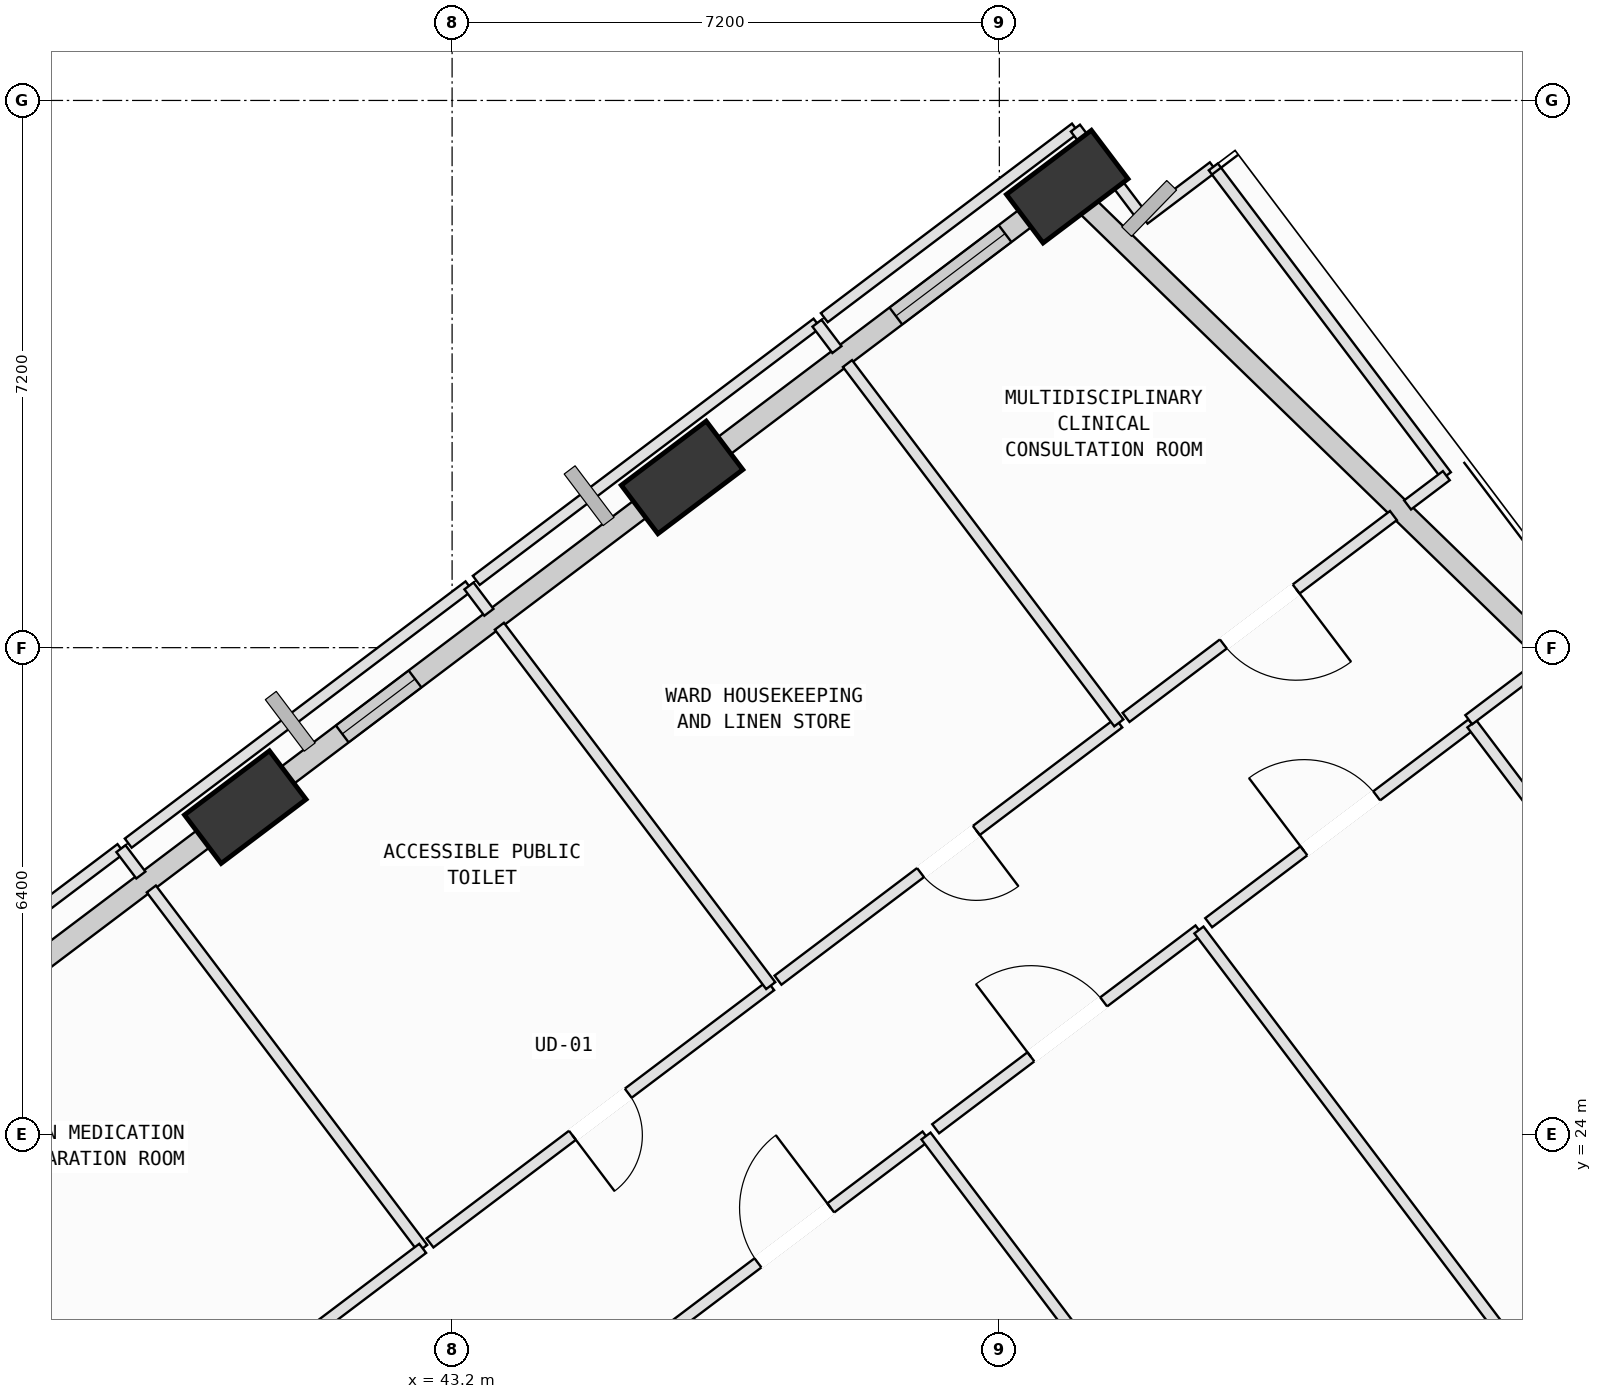
"""IFC4 building model, lengths in metres.
Left out: names, types, materials, properties, quantities, classifications, styles, units other than length and angle.
Written with IfcOpenShell. Run it as: python <this file> out.ifc"""

import sys

from ifc_helpers import new_model, si_unit, direction, frame, frame_2d, origin, origin_2d, place, context, subcontext, project, spatial, rectangle, extrude, element, fill, save


model = new_model("IFC4")
c1 = context("Model", 3, precision=1e-05, world=origin(), true_north=direction((0.0, 1.0)))
c2 = subcontext(c1, "Body", "Model", "MODEL_VIEW")
j1 = project(units=[si_unit("LENGTHUNIT", "METRE"), si_unit("PLANEANGLEUNIT", "RADIAN")], contexts=[c1])
p1 = place(None, origin())
s1 = spatial("IfcSite", under=j1, at=p1, CompositionType="ELEMENT")
p2 = place(p1, origin())
s2 = spatial("IfcBuilding", under=s1, at=p2, CompositionType="ELEMENT")
p3 = place(p2, frame((0.0, 0.0, 181.8)))
s3 = spatial("IfcBuildingStorey", under=s2, at=p3, CompositionType="ELEMENT", Elevation=181.8)
p4 = place(p3, frame((51.293, 36.466, 0.002), z_axis=(-0.048746278721, 0.072662992251, 0.996164589748), x_axis=(-0.328408762811, -0.943063285479, 0.052719295244)))
e1 = element("IfcColumn", 1, at=p4, inside=s3, PredefinedType="COLUMN", context=c2, shape_type="SweptSolid", body=[
    extrude(rectangle(XDim=1.4, YDim=0.8, at=origin_2d()), origin(), (0.0, 0.0, 1.0), 4.012),
])
p5 = place(p3, frame((46.225, 32.64, 0.002), z_axis=(-0.032865817855, 0.051951162918, 0.998108668777), x_axis=(-0.352963227401, -0.934903778512, 0.037038966322)))
e2 = element("IfcColumn", 2, at=p5, inside=s3, PredefinedType="COLUMN", context=c2, shape_type="SweptSolid", body=[
    extrude(rectangle(XDim=1.4, YDim=0.8, at=origin_2d()), origin(), (0.0, 0.0, 1.0), 4.004),
])
p6 = place(p3, frame((40.479, 28.302, 0.002), z_axis=(-0.014715421442, 0.028392825604, 0.999488521108), x_axis=(-0.431491023148, -0.90191143544, 0.019268097068)))
e3 = element("IfcColumn", 3, at=p6, inside=s3, PredefinedType="COLUMN", context=c2, shape_type="SweptSolid", body=[
    extrude(rectangle(XDim=1.4, YDim=0.8, at=origin_2d()), origin(), (0.0, 0.0, 1.0), 3.998),
])
p7 = place(p3, frame((51.525, 36.24, 0.0), z_axis=(0.0, 0.0, 1.0), x_axis=(0.717404025955, -0.696657350169, 0.0)))
e4 = element("IfcWall", 4, at=p7, inside=s3, PredefinedType="SOLIDWALL", context=c2, shape_type="SweptSolid", body=[
    extrude(rectangle(XDim=8.838, YDim=0.28, at=frame_2d((4.419, 0.0))), origin(), (0.0, 0.0, 1.0), 3.265),
])
p8 = place(p3, frame((46.617, 32.936, 0.0), z_axis=(0.0, 0.0, 1.0), x_axis=(0.798109637952, 0.602512245359, 0.0)))
e5 = element("IfcWall", 5, at=p8, inside=s3, PredefinedType="SOLIDWALL", context=c2, shape_type="SweptSolid", body=[
    extrude(rectangle(XDim=5.405, YDim=0.28, at=frame_2d((2.702, 0.0))), origin(), (0.0, 0.0, 1.0), 3.265),
])
p9 = place(p8, frame((3.034, 0.0, 0.75)))
e6 = element("IfcOpeningElement", 6, at=p9, cuts=e5, PredefinedType="OPENING", context=c2, shape_type="SweptSolid", body=[
    extrude(rectangle(XDim=1.8, YDim=2.05, at=frame_2d((0.9, 1.025))), frame((0.0, 0.15, 0.0), z_axis=(0.0, -1.0, 0.0), x_axis=(1.0, 0.0, 0.0)), (0.0, 0.0, 1.0), 0.3),
])
p10 = place(p3, frame((40.88, 28.604, 0.0), z_axis=(0.0, 0.0, 1.0), x_axis=(0.798099856312, 0.602525202257, 0.0)))
e7 = element("IfcWall", 7, at=p10, inside=s3, PredefinedType="SOLIDWALL", context=c2, shape_type="SweptSolid", body=[
    extrude(rectangle(XDim=6.227, YDim=0.28, at=frame_2d((3.113, 0.0))), origin(), (0.0, 0.0, 1.0), 3.065),
])
p11 = place(p10, frame((1.096, 0.0, 0.75)))
e8 = element("IfcOpeningElement", 8, at=p11, cuts=e7, PredefinedType="OPENING", context=c2, shape_type="SweptSolid", body=[
    extrude(rectangle(XDim=1.2, YDim=1.75, at=frame_2d((0.6, 0.875))), frame((0.0, 0.15, 0.0), z_axis=(0.0, -1.0, 0.0), x_axis=(1.0, 0.0, 0.0)), (0.0, 0.0, 1.0), 0.3),
])
p12 = place(p3, frame((35.138, 24.269, 0.0), z_axis=(0.0, 0.0, 1.0), x_axis=(0.798109261366, 0.602512744199, 0.0)))
e9 = element("IfcWall", 9, at=p12, inside=s3, PredefinedType="SOLIDWALL", context=c2, shape_type="SweptSolid", body=[
    extrude(rectangle(XDim=6.211, YDim=0.28, at=frame_2d((3.105, 0.0))), origin(), (0.0, 0.0, 1.0), 3.265),
])
p13 = place(p12, frame((1.624, 0.0, 0.75)))
e10 = element("IfcOpeningElement", 10, at=p13, cuts=e9, PredefinedType="OPENING", context=c2, shape_type="SweptSolid", body=[
    extrude(rectangle(XDim=1.6, YDim=1.95, at=frame_2d((0.8, 0.975))), frame((0.0, 0.15, 0.0), z_axis=(0.0, -1.0, 0.0), x_axis=(1.0, 0.0, 0.0)), (0.0, 0.0, 1.0), 0.3),
])
p14 = place(p3, frame((45.971, 21.359, 0.0), z_axis=(0.0, 0.0, 1.0), x_axis=(0.79809932877, 0.602525901035, 0.0)))
e11 = element("IfcWall", 11, at=p14, inside=s3, PredefinedType="PARTITIONING", context=c2, shape_type="SweptSolid", body=[
    extrude(rectangle(XDim=4.34, YDim=0.15, at=frame_2d((2.17, 0.0))), origin(), (0.0, 0.0, 1.0), 3.78),
])
p15 = place(p14, frame((1.57, 0.0, 0.0)))
e12 = element("IfcOpeningElement", 12, at=p15, cuts=e11, PredefinedType="OPENING", context=c2, shape_type="SweptSolid", body=[
    extrude(rectangle(XDim=1.2, YDim=2.15, at=frame_2d((0.6, 1.075))), frame((0.0, 0.085, 0.0), z_axis=(0.0, -1.0, 0.0), x_axis=(1.0, 0.0, 0.0)), (0.0, 0.0, 1.0), 0.17),
])
p16 = place(p3, frame((49.435, 23.974, 0.0), z_axis=(0.0, 0.0, 1.0), x_axis=(0.60250679657, -0.798113751346, 0.0)))
e13 = element("IfcWall", 13, at=p16, inside=s3, PredefinedType="PARTITIONING", context=c2, shape_type="SweptSolid", body=[
    extrude(rectangle(XDim=12.28, YDim=0.15, at=frame_2d((6.14, 0.0))), origin(), (0.0, 0.0, 1.0), 3.78),
])
p17 = place(p3, frame((49.562, 24.07, 0.0), z_axis=(0.0, 0.0, 1.0), x_axis=(0.798105957369, 0.602517120763, 0.0)))
e14 = element("IfcWall", 14, at=p17, inside=s3, PredefinedType="PARTITIONING", context=c2, shape_type="SweptSolid", body=[
    extrude(rectangle(XDim=4.34, YDim=0.15, at=frame_2d((2.17, 0.0))), origin(), (0.0, 0.0, 1.0), 3.065),
])
p18 = place(p17, frame((1.57, 0.0, 0.0)))
e15 = element("IfcOpeningElement", 15, at=p18, cuts=e14, PredefinedType="OPENING", context=c2, shape_type="SweptSolid", body=[
    extrude(rectangle(XDim=1.2, YDim=2.15, at=frame_2d((0.6, 1.075))), frame((0.0, 0.085, 0.0), z_axis=(0.0, -1.0, 0.0), x_axis=(1.0, 0.0, 0.0)), (0.0, 0.0, 1.0), 0.17),
])
p19 = place(p3, frame((53.026, 26.685, 0.0), z_axis=(0.0, 0.0, 1.0), x_axis=(0.602533536667, -0.798093564184, 0.0)))
e16 = element("IfcWall", 16, at=p19, inside=s3, PredefinedType="PARTITIONING", context=c2, shape_type="SweptSolid", body=[
    extrude(rectangle(XDim=11.935, YDim=0.15, at=frame_2d((5.967, 0.0))), origin(), (0.0, 0.0, 1.0), 3.78),
])
p20 = place(p3, frame((53.154, 26.781, 0.0), z_axis=(0.0, 0.0, 1.0), x_axis=(0.798105957369, 0.602517120763, 0.0)))
e17 = element("IfcWall", 17, at=p20, inside=s3, PredefinedType="PARTITIONING", context=c2, shape_type="SweptSolid", body=[
    extrude(rectangle(XDim=4.34, YDim=0.15, at=frame_2d((2.17, 0.0))), origin(), (0.0, 0.0, 1.0), 3.065),
])
p21 = place(p20, frame((1.57, 0.0, 0.0)))
e18 = element("IfcOpeningElement", 18, at=p21, cuts=e17, PredefinedType="OPENING", context=c2, shape_type="SweptSolid", body=[
    extrude(rectangle(XDim=1.2, YDim=2.15, at=frame_2d((0.6, 1.075))), frame((0.0, 0.085, 0.0), z_axis=(0.0, -1.0, 0.0), x_axis=(1.0, 0.0, 0.0)), (0.0, 0.0, 1.0), 0.17),
])
p22 = place(p3, frame((56.618, 29.396, 0.0), z_axis=(0.0, 0.0, 1.0), x_axis=(0.602496773162, -0.798121318053, 0.0)))
e19 = element("IfcWall", 19, at=p22, inside=s3, PredefinedType="PARTITIONING", context=c2, shape_type="SweptSolid", body=[
    extrude(rectangle(XDim=9.829, YDim=0.15, at=frame_2d((4.915, 0.0))), origin(), (0.0, 0.0, 1.0), 3.78),
])
p23 = place(p22, frame((4.485, 0.0, 0.0)))
e20 = element("IfcOpeningElement", 20, at=p23, cuts=e19, PredefinedType="OPENING", context=c2, shape_type="SweptSolid", body=[
    extrude(rectangle(XDim=0.86, YDim=2.06, at=frame_2d((0.43, 1.03))), frame((0.0, 0.085, 0.0), z_axis=(0.0, -1.0, 0.0), x_axis=(1.0, 0.0, 0.0)), (0.0, 0.0, 1.0), 0.17),
])
p24 = place(p3, frame((34.359, 24.371, 0.0), z_axis=(0.0, 0.0, 1.0), x_axis=(0.798228577004, 0.602354662017, 0.0)))
e21 = element("IfcWall", 21, at=p24, inside=s3, PredefinedType="PARTITIONING", context=c2, shape_type="SweptSolid", body=[
    extrude(rectangle(XDim=5.618, YDim=0.15, at=frame_2d((2.809, 0.0))), origin(), (0.0, 0.0, 1.0), 3.78),
])
p25 = place(p3, frame((38.843, 27.755, 0.0), z_axis=(0.0, 0.0, 1.0), x_axis=(0.602602666336, -0.798041368931, 0.0)))
e22 = element("IfcWall", 22, at=p25, inside=s3, PredefinedType="PARTITIONING", context=c2, shape_type="SweptSolid", body=[
    extrude(rectangle(XDim=0.435, YDim=0.15, at=frame_2d((0.217, 0.0))), origin(), (0.0, 0.0, 1.0), 3.78),
])
p26 = place(p3, frame((39.243, 27.225, 0.0), z_axis=(0.0, 0.0, 1.0), x_axis=(0.602515370823, -0.798107278455, 0.0)))
e23 = element("IfcWall", 23, at=p26, inside=s3, PredefinedType="PARTITIONING", context=c2, shape_type="SweptSolid", body=[
    extrude(rectangle(XDim=5.925, YDim=0.15, at=frame_2d((2.963, 0.0))), origin(), (0.0, 0.0, 1.0), 3.78),
])
p27 = place(p3, frame((42.813, 22.496, 0.0), z_axis=(0.0, 0.0, 1.0), x_axis=(-0.798022287303, -0.602627935768, 0.0)))
e24 = element("IfcWall", 24, at=p27, inside=s3, PredefinedType="PARTITIONING", context=c2, shape_type="SweptSolid", body=[
    extrude(rectangle(XDim=3.014, YDim=0.15, at=frame_2d((1.507, 0.0))), origin(), (0.0, 0.0, 1.0), 3.78),
])
p28 = place(p3, frame((47.392, 25.953, 0.0), z_axis=(0.0, 0.0, 1.0), x_axis=(-0.79808188884, -0.602549001083, 0.0)))
e25 = element("IfcWall", 25, at=p28, inside=s3, PredefinedType="PARTITIONING", context=c2, shape_type="SweptSolid", body=[
    extrude(rectangle(XDim=5.617, YDim=0.15, at=frame_2d((2.809, 0.0))), origin(), (0.0, 0.0, 1.0), 3.78),
])
p29 = place(p28, frame((2.349, 0.0, 0.0)))
e26 = element("IfcOpeningElement", 26, at=p29, cuts=e25, PredefinedType="OPENING", context=c2, shape_type="SweptSolid", body=[
    extrude(rectangle(XDim=0.92, YDim=2.1, at=frame_2d((0.46, 1.05))), frame((0.0, 0.085, 0.0), z_axis=(0.0, -1.0, 0.0), x_axis=(1.0, 0.0, 0.0)), (0.0, 0.0, 1.0), 0.17),
])
p30 = place(p3, frame((38.939, 27.828, 0.0), z_axis=(0.0, 0.0, 1.0), x_axis=(0.798144589063, 0.602465945053, 0.0)))
e27 = element("IfcWall", 27, at=p30, inside=s3, PredefinedType="PARTITIONING", context=c2, shape_type="SweptSolid", body=[
    extrude(rectangle(XDim=5.617, YDim=0.15, at=frame_2d((2.809, 0.0))), origin(), (0.0, 0.0, 1.0), 3.265),
])
p31 = place(p3, frame((43.422, 31.212, 0.0), z_axis=(0.0, 0.0, 1.0), x_axis=(0.602602666336, -0.798041368931, 0.0)))
e28 = element("IfcWall", 28, at=p31, inside=s3, PredefinedType="PARTITIONING", context=c2, shape_type="SweptSolid", body=[
    extrude(rectangle(XDim=0.435, YDim=0.15, at=frame_2d((0.217, 0.0))), origin(), (0.0, 0.0, 1.0), 3.78),
])
p32 = place(p3, frame((43.822, 30.682, 0.0), z_axis=(0.0, 0.0, 1.0), x_axis=(0.602515370823, -0.798107278455, 0.0)))
e29 = element("IfcWall", 29, at=p32, inside=s3, PredefinedType="PARTITIONING", context=c2, shape_type="SweptSolid", body=[
    extrude(rectangle(XDim=5.925, YDim=0.15, at=frame_2d((2.963, 0.0))), origin(), (0.0, 0.0, 1.0), 3.78),
])
p33 = place(p3, frame((51.972, 29.41, 0.0), z_axis=(0.0, 0.0, 1.0), x_axis=(-0.798108322746, -0.602513987525, 0.0)))
e30 = element("IfcWall", 30, at=p33, inside=s3, PredefinedType="PARTITIONING", context=c2, shape_type="SweptSolid", body=[
    extrude(rectangle(XDim=5.618, YDim=0.15, at=frame_2d((2.809, 0.0))), origin(), (0.0, 0.0, 1.0), 3.78),
])
p34 = place(p33, frame((2.349, 0.0, 0.0)))
e31 = element("IfcOpeningElement", 31, at=p34, cuts=e30, PredefinedType="OPENING", context=c2, shape_type="SweptSolid", body=[
    extrude(rectangle(XDim=0.92, YDim=2.1, at=frame_2d((0.46, 1.05))), frame((0.0, 0.085, 0.0), z_axis=(0.0, -1.0, 0.0), x_axis=(1.0, 0.0, 0.0)), (0.0, 0.0, 1.0), 0.17),
])
p35 = place(p3, frame((43.518, 31.285, 0.0), z_axis=(0.0, 0.0, 1.0), x_axis=(0.798128812023, 0.602486845847, 0.0)))
e32 = element("IfcWall", 32, at=p35, inside=s3, PredefinedType="PARTITIONING", context=c2, shape_type="SweptSolid", body=[
    extrude(rectangle(XDim=5.617, YDim=0.15, at=frame_2d((2.808, 0.0))), origin(), (0.0, 0.0, 1.0), 3.065),
])
p36 = place(p3, frame((48.001, 34.669, 0.0), z_axis=(0.0, 0.0, 1.0), x_axis=(0.602602666336, -0.798041368931, 0.0)))
e33 = element("IfcWall", 33, at=p36, inside=s3, PredefinedType="PARTITIONING", context=c2, shape_type="SweptSolid", body=[
    extrude(rectangle(XDim=0.435, YDim=0.15, at=frame_2d((0.217, 0.0))), origin(), (0.0, 0.0, 1.0), 3.78),
])
p37 = place(p3, frame((48.402, 34.138, 0.0), z_axis=(0.0, 0.0, 1.0), x_axis=(0.602568386296, -0.798067252703, 0.0)))
e34 = element("IfcWall", 34, at=p37, inside=s3, PredefinedType="PARTITIONING", context=c2, shape_type="SweptSolid", body=[
    extrude(rectangle(XDim=5.924, YDim=0.15, at=frame_2d((2.962, 0.0))), origin(), (0.0, 0.0, 1.0), 3.78),
])
p38 = place(p3, frame((52.305, 36.039, 0.0), z_axis=(0.0, 0.0, 1.0), x_axis=(0.798146416717, 0.602463523777, 0.0)))
e35 = element("IfcWall", 35, at=p38, inside=s3, PredefinedType="PARTITIONING", context=c2, shape_type="SweptSolid", body=[
    extrude(rectangle(XDim=1.14, YDim=0.15, at=frame_2d((0.57, 0.0))), origin(), (0.0, 0.0, 1.0), 3.78),
])
p39 = place(p3, frame((53.215, 36.726, 0.0), z_axis=(0.0, 0.0, 1.0), x_axis=(0.602345786441, -0.798235274563, 0.0)))
e36 = element("IfcWall", 36, at=p39, inside=s3, PredefinedType="PARTITIONING", context=c2, shape_type="SweptSolid", body=[
    extrude(rectangle(XDim=5.09, YDim=0.15, at=frame_2d((2.545, 0.0))), origin(), (0.0, 0.0, 1.0), 3.78),
])
p40 = place(p3, frame((56.281, 32.663, 0.0), z_axis=(0.0, 0.0, 1.0), x_axis=(-0.798116355304, -0.602503347207, 0.0)))
e37 = element("IfcWall", 37, at=p40, inside=s3, PredefinedType="PARTITIONING", context=c2, shape_type="SweptSolid", body=[
    extrude(rectangle(XDim=0.639, YDim=0.15, at=frame_2d((0.319, 0.0))), origin(), (0.0, 0.0, 1.0), 3.78),
])
p41 = place(p3, frame((55.585, 32.138, 0.0), z_axis=(0.0, 0.0, 1.0), x_axis=(-0.798095178634, -0.60253139822, 0.0)))
e38 = element("IfcWall", 38, at=p41, inside=s3, PredefinedType="PARTITIONING", context=c2, shape_type="SweptSolid", body=[
    extrude(rectangle(XDim=4.408, YDim=0.15, at=frame_2d((2.204, 0.0))), origin(), (0.0, 0.0, 1.0), 3.78),
])
p42 = place(p41, frame((1.604, 0.0, 0.0)))
e39 = element("IfcOpeningElement", 39, at=p42, cuts=e38, PredefinedType="OPENING", context=c2, shape_type="SweptSolid", body=[
    extrude(rectangle(XDim=1.2, YDim=2.15, at=frame_2d((0.6, 1.075))), frame((0.0, 0.085, 0.0), z_axis=(0.0, -1.0, 0.0), x_axis=(1.0, 0.0, 0.0)), (0.0, 0.0, 1.0), 0.17),
])
p43 = place(p3, frame((48.097, 34.742, 0.0), z_axis=(0.0, 0.0, 1.0), x_axis=(0.798120658776, 0.602497646498, 0.0)))
e40 = element("IfcWall", 40, at=p43, inside=s3, PredefinedType="PARTITIONING", context=c2, shape_type="SweptSolid", body=[
    extrude(rectangle(XDim=4.14, YDim=0.15, at=frame_2d((2.07, 0.0))), origin(), (0.0, 0.0, 1.0), 3.265),
])
p44 = place(p3, frame((51.401, 37.236, 0.0), z_axis=(0.0, 0.0, 1.0), x_axis=(0.602678817018, -0.79798386169, 0.0)))
e41 = element("IfcWall", 41, at=p44, inside=s3, PredefinedType="PARTITIONING", context=c2, shape_type="SweptSolid", body=[
    extrude(rectangle(XDim=1.5, YDim=0.15, at=frame_2d((0.75, 0.0))), origin(), (0.0, 0.0, 1.0), 3.265),
])
p45 = place(p3, frame((56.576, 29.452, 0.0), z_axis=(0.0, 0.0, 1.0), x_axis=(0.798123673532, 0.602493652869, 0.0)))
e42 = element("IfcWall", 42, at=p45, inside=s3, PredefinedType="PARTITIONING", context=c2, shape_type="SweptSolid", body=[
    extrude(rectangle(XDim=1.252, YDim=0.15, at=frame_2d((0.626, 0.0))), origin(), (0.0, 0.0, 1.0), 3.065),
])
p46 = place(p9, origin())
e43 = element("IfcWindow", 43, at=p46, inside=s3, PartitioningType="SINGLE_PANEL", PredefinedType="WINDOW", context=c2, shape_type="SweptSolid", body=[
    extrude(rectangle(XDim=1.8, YDim=2.05, at=frame_2d((0.9, 1.025))), frame((0.0, 0.03, 0.0), z_axis=(0.0, -1.0, 0.0), x_axis=(1.0, 0.0, 0.0)), (0.0, 0.0, 1.0), 0.06),
])
fill(e6, e43)
p47 = place(p11, origin())
e44 = element("IfcWindow", 44, at=p47, inside=s3, PartitioningType="SINGLE_PANEL", PredefinedType="WINDOW", context=c2, shape_type="SweptSolid", body=[
    extrude(rectangle(XDim=1.2, YDim=1.75, at=frame_2d((0.6, 0.875))), frame((0.0, 0.03, 0.0), z_axis=(0.0, -1.0, 0.0), x_axis=(1.0, 0.0, 0.0)), (0.0, 0.0, 1.0), 0.06),
])
fill(e8, e44)
p48 = place(p15, origin())
e45 = element("IfcDoor", 45, at=p48, inside=s3, OperationType="SINGLE_SWING_RIGHT", PredefinedType="DOOR", context=c2, shape_type="SweptSolid", body=[
    extrude(rectangle(XDim=1.2, YDim=2.15, at=frame_2d((0.6, 1.075))), frame((0.0, 0.025, 0.0), z_axis=(0.0, -1.0, 0.0), x_axis=(1.0, 0.0, 0.0)), (0.0, 0.0, 1.0), 0.05),
])
fill(e12, e45)
p49 = place(p18, origin())
e46 = element("IfcDoor", 46, at=p49, inside=s3, OperationType="SINGLE_SWING_LEFT", PredefinedType="DOOR", context=c2, shape_type="SweptSolid", body=[
    extrude(rectangle(XDim=1.2, YDim=2.15, at=frame_2d((0.6, 1.075))), frame((0.0, 0.025, 0.0), z_axis=(0.0, -1.0, 0.0), x_axis=(1.0, 0.0, 0.0)), (0.0, 0.0, 1.0), 0.05),
])
fill(e15, e46)
p50 = place(p21, origin())
e47 = element("IfcDoor", 47, at=p50, inside=s3, OperationType="SINGLE_SWING_LEFT", PredefinedType="DOOR", context=c2, shape_type="SweptSolid", body=[
    extrude(rectangle(XDim=1.2, YDim=2.15, at=frame_2d((0.6, 1.075))), frame((0.0, 0.025, 0.0), z_axis=(0.0, -1.0, 0.0), x_axis=(1.0, 0.0, 0.0)), (0.0, 0.0, 1.0), 0.05),
])
fill(e18, e47)
p51 = place(p29, origin())
e48 = element("IfcDoor", 48, at=p51, inside=s3, OperationType="SINGLE_SWING_RIGHT", PredefinedType="DOOR", context=c2, shape_type="SweptSolid", body=[
    extrude(rectangle(XDim=0.92, YDim=2.1, at=frame_2d((0.46, 1.05))), frame((0.0, 0.025, 0.0), z_axis=(0.0, -1.0, 0.0), x_axis=(1.0, 0.0, 0.0)), (0.0, 0.0, 1.0), 0.05),
])
fill(e26, e48)
p52 = place(p34, origin())
e49 = element("IfcDoor", 49, at=p52, inside=s3, OperationType="SINGLE_SWING_LEFT", PredefinedType="DOOR", context=c2, shape_type="SweptSolid", body=[
    extrude(rectangle(XDim=0.92, YDim=2.1, at=frame_2d((0.46, 1.05))), frame((0.0, 0.025, 0.0), z_axis=(0.0, -1.0, 0.0), x_axis=(1.0, 0.0, 0.0)), (0.0, 0.0, 1.0), 0.05),
])
fill(e31, e49)
p53 = place(p42, origin())
e50 = element("IfcDoor", 50, at=p53, inside=s3, OperationType="SINGLE_SWING_LEFT", PredefinedType="DOOR", context=c2, shape_type="SweptSolid", body=[
    extrude(rectangle(XDim=1.2, YDim=2.15, at=frame_2d((0.6, 1.075))), frame((0.0, 0.025, 0.0), z_axis=(0.0, -1.0, 0.0), x_axis=(1.0, 0.0, 0.0)), (0.0, 0.0, 1.0), 0.05),
])
fill(e39, e50)
save(model, sys.argv[1])
